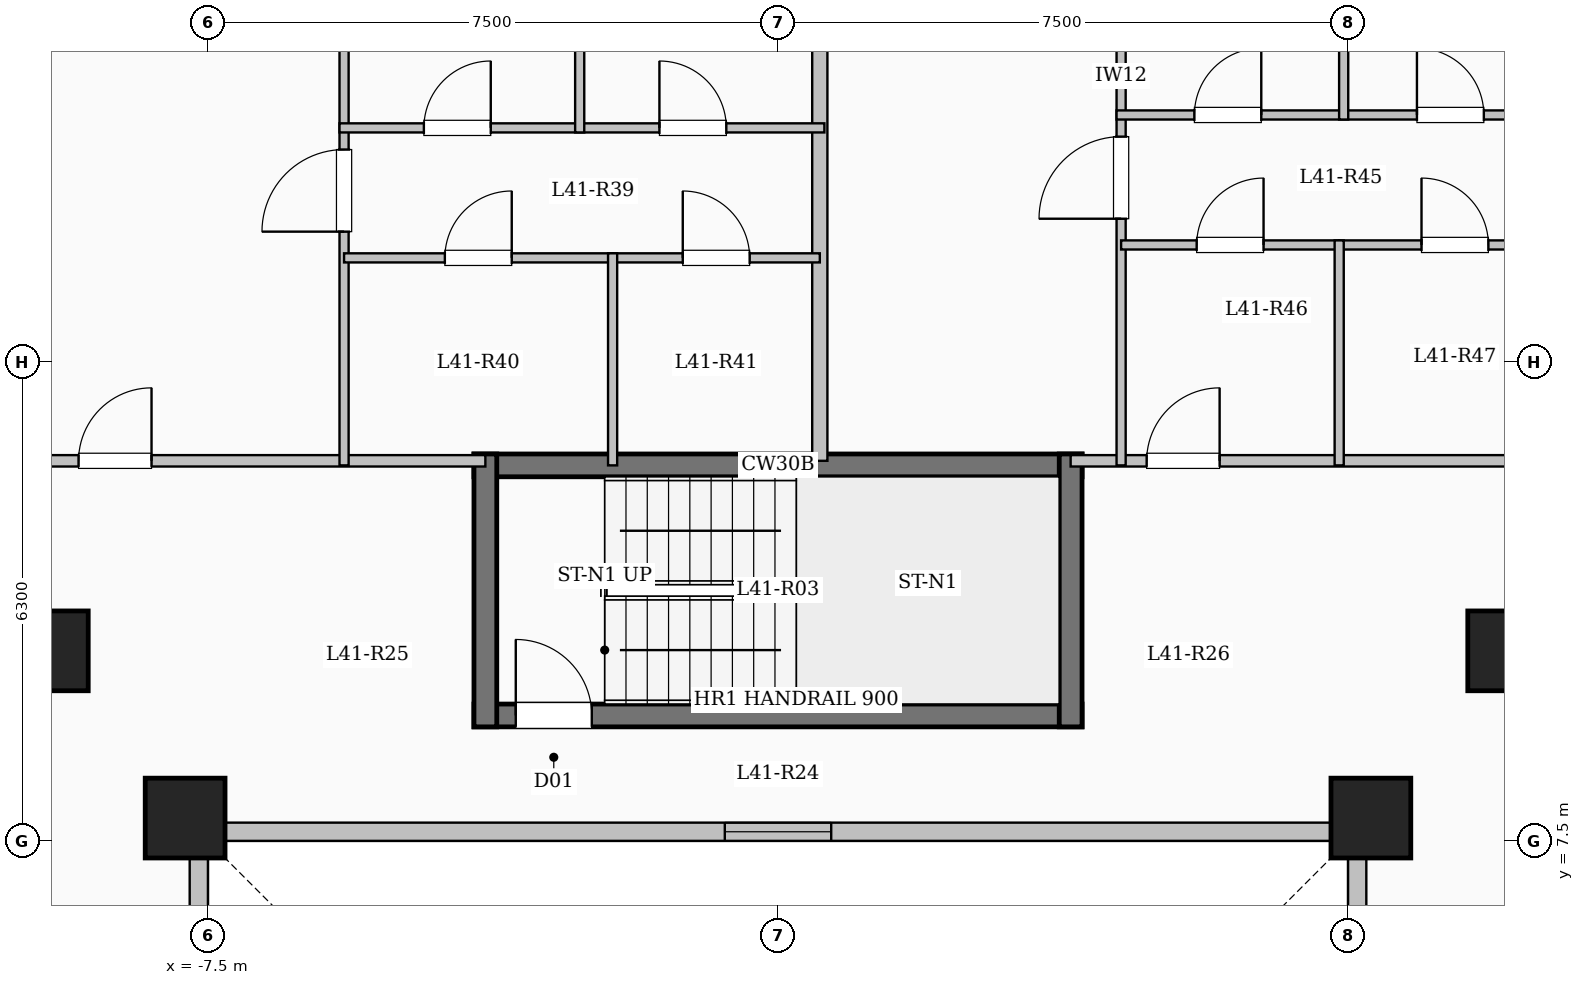
"""IFC4 building model, lengths in metres.
Left out: names, types, materials, properties, quantities, classifications, styles, units other than length and angle.
Written with IfcOpenShell. Run it as: python <this file> out.ifc"""

import sys

from ifc_helpers import new_model, si_unit, direction, frame, frame_2d, origin, origin_2d, place, context, subcontext, project, spatial, rectangle, extrude, element, fill, save


model = new_model("IFC4")
c1 = context("Model", 3, precision=1e-05, world=origin(), true_north=direction((0.0, 1.0)))
c2 = subcontext(c1, "Body", "Model", "MODEL_VIEW")
j1 = project(units=[si_unit("LENGTHUNIT", "METRE"), si_unit("PLANEANGLEUNIT", "RADIAN")], contexts=[c1])
p1 = place(None, origin())
s1 = spatial("IfcSite", under=j1, at=p1, CompositionType="ELEMENT")
p2 = place(p1, origin())
s2 = spatial("IfcBuilding", under=s1, at=p2, CompositionType="ELEMENT")
p3 = place(p2, frame((0.0, 0.0, 152.7)))
s3 = spatial("IfcBuildingStorey", under=s2, at=p3, CompositionType="ELEMENT", Elevation=152.7)
for number, where, z_axis, x_axis in (
    (1, (-7.8, 7.8, 0.0), (0.0, 0.0, 1.0), (1.0, 0.0, 0.0)),
    (2, (7.8, 7.8, 0.0), (0.0, 0.0, 1.0), (1.0, 0.0, 0.0)),
    (3, (-9.6, 10.0, 0.0), (0.0, 0.0, 1.0), (1.0, 0.0, 0.0)),
    (4, (9.6, 10.0, 0.0), (0.0, 0.0, 1.0), (1.0, 0.0, 0.0)),
):
    element("IfcColumn", number, at=place(p3, frame(where, z_axis=z_axis, x_axis=x_axis)), inside=s3, PredefinedType="COLUMN", context=c2, shape_type="SweptSolid", body=[
        extrude(rectangle(XDim=1.05, YDim=1.05, at=origin_2d()), origin(), (0.0, 0.0, 1.0), 3.35),
    ])
p4 = place(p3, frame((7.62, -7.62, 0.0), z_axis=(0.0, 0.0, 1.0), x_axis=(0.0, 1.0, 0.0)))
e5 = element("IfcWall", 5, at=p4, inside=s3, PredefinedType="SOLIDWALL", context=c2, shape_type="SweptSolid", body=[
    extrude(rectangle(XDim=15.24, YDim=0.24, at=frame_2d((7.62, 0.0))), origin(), (0.0, 0.0, 1.0), 3.1),
])
p5 = place(p4, frame((6.92, 0.0, 0.95)))
e6 = element("IfcOpeningElement", 6, at=p5, cuts=e5, PredefinedType="OPENING", context=c2, shape_type="SweptSolid", body=[
    extrude(rectangle(XDim=1.4, YDim=1.5, at=frame_2d((0.7, 0.75))), frame((0.0, 0.13, 0.0), z_axis=(0.0, -1.0, 0.0), x_axis=(1.0, 0.0, 0.0)), (0.0, 0.0, 1.0), 0.26),
])
p6 = place(p3, frame((7.62, 7.62, 0.0), z_axis=(0.0, 0.0, 1.0), x_axis=(-1.0, 0.0, 0.0)))
e7 = element("IfcWall", 7, at=p6, inside=s3, PredefinedType="SOLIDWALL", context=c2, shape_type="SweptSolid", body=[
    extrude(rectangle(XDim=15.24, YDim=0.24, at=frame_2d((7.62, 0.0))), origin(), (0.0, 0.0, 1.0), 3.1),
])
p7 = place(p6, frame((6.92, 0.0, 0.95)))
e8 = element("IfcOpeningElement", 8, at=p7, cuts=e7, PredefinedType="OPENING", context=c2, shape_type="SweptSolid", body=[
    extrude(rectangle(XDim=1.4, YDim=1.5, at=frame_2d((0.7, 0.75))), frame((0.0, 0.13, 0.0), z_axis=(0.0, -1.0, 0.0), x_axis=(1.0, 0.0, 0.0)), (0.0, 0.0, 1.0), 0.26),
])
p8 = place(p3, frame((-7.62, 7.62, 0.0), z_axis=(0.0, 0.0, 1.0), x_axis=(0.0, -1.0, 0.0)))
e9 = element("IfcWall", 9, at=p8, inside=s3, PredefinedType="SOLIDWALL", context=c2, shape_type="SweptSolid", body=[
    extrude(rectangle(XDim=15.24, YDim=0.24, at=frame_2d((7.62, 0.0))), origin(), (0.0, 0.0, 1.0), 3.1),
])
p9 = place(p8, frame((6.92, 0.0, 0.95)))
e10 = element("IfcOpeningElement", 10, at=p9, cuts=e9, PredefinedType="OPENING", context=c2, shape_type="SweptSolid", body=[
    extrude(rectangle(XDim=1.4, YDim=1.5, at=frame_2d((0.7, 0.75))), frame((0.0, 0.13, 0.0), z_axis=(0.0, -1.0, 0.0), x_axis=(1.0, 0.0, 0.0)), (0.0, 0.0, 1.0), 0.26),
])
p10 = place(p3, frame((-4.0, 12.44, 0.0), z_axis=(0.0, 0.0, 1.0), x_axis=(1.0, 0.0, 0.0)))
e11 = element("IfcWall", 11, at=p10, inside=s3, PredefinedType="SHEAR", context=c2, shape_type="SweptSolid", body=[
    extrude(rectangle(XDim=8.0, YDim=0.3, at=frame_2d((4.0, 0.0))), origin(), (0.0, 0.0, 1.0), 3.35),
])
p11 = place(p3, frame((-4.0, 9.15, 0.0), z_axis=(0.0, 0.0, 1.0), x_axis=(1.0, 0.0, 0.0)))
e12 = element("IfcWall", 12, at=p11, inside=s3, PredefinedType="SHEAR", context=c2, shape_type="SweptSolid", body=[
    extrude(rectangle(XDim=8.0, YDim=0.3, at=frame_2d((4.0, 0.0))), origin(), (0.0, 0.0, 1.0), 3.35),
])
p12 = place(p11, frame((0.55, 0.0, 0.0)))
e13 = element("IfcOpeningElement", 13, at=p12, cuts=e12, PredefinedType="OPENING", context=c2, shape_type="SweptSolid", body=[
    extrude(rectangle(XDim=1.0, YDim=2.15, at=frame_2d((0.5, 1.075))), frame((0.0, 0.16, 0.0), z_axis=(0.0, -1.0, 0.0), x_axis=(1.0, 0.0, 0.0)), (0.0, 0.0, 1.0), 0.32),
])
for number, where, z_axis, x_axis in (
    (14, (-3.85, 9.0, 0.0), (0.0, 0.0, 1.0), (0.0, 1.0, 0.0)),
    (15, (3.85, 9.0, 0.0), (0.0, 0.0, 1.0), (0.0, 1.0, 0.0)),
):
    element("IfcWall", number, at=place(p3, frame(where, z_axis=z_axis, x_axis=x_axis)), inside=s3, PredefinedType="SHEAR", context=c2, shape_type="SweptSolid", body=[
        extrude(rectangle(XDim=3.59, YDim=0.3, at=frame_2d((1.795, 0.0))), origin(), (0.0, 0.0, 1.0), 3.35),
    ])
p13 = place(p3, frame((-19.55, 12.5, 0.0), z_axis=(0.0, 0.0, 1.0), x_axis=(1.0, 0.0, 0.0)))
e16 = element("IfcWall", 16, at=p13, inside=s3, PredefinedType="PARTITIONING", context=c2, shape_type="SweptSolid", body=[
    extrude(rectangle(XDim=15.7, YDim=0.15, at=frame_2d((7.85, 0.0))), origin(), (0.0, 0.0, 1.0), 3.1),
])
p14 = place(p13, frame((0.7, 0.0, 0.0)))
e17 = element("IfcOpeningElement", 17, at=p14, cuts=e16, PredefinedType="OPENING", context=c2, shape_type="SweptSolid", body=[
    extrude(rectangle(XDim=0.96, YDim=2.15, at=frame_2d((0.48, 1.075))), frame((0.0, 0.085, 0.0), z_axis=(0.0, -1.0, 0.0), x_axis=(1.0, 0.0, 0.0)), (0.0, 0.0, 1.0), 0.17),
])
p15 = place(p13, frame((10.348, 0.0, 0.0)))
e18 = element("IfcOpeningElement", 18, at=p15, cuts=e16, PredefinedType="OPENING", context=c2, shape_type="SweptSolid", body=[
    extrude(rectangle(XDim=0.96, YDim=2.15, at=frame_2d((0.48, 1.075))), frame((0.0, 0.085, 0.0), z_axis=(0.0, -1.0, 0.0), x_axis=(1.0, 0.0, 0.0)), (0.0, 0.0, 1.0), 0.17),
])
p16 = place(p3, frame((3.85, 12.5, 0.0), z_axis=(0.0, 0.0, 1.0), x_axis=(1.0, 0.0, 0.0)))
e19 = element("IfcWall", 19, at=p16, inside=s3, PredefinedType="PARTITIONING", context=c2, shape_type="SweptSolid", body=[
    extrude(rectangle(XDim=15.7, YDim=0.15, at=frame_2d((7.85, 0.0))), origin(), (0.0, 0.0, 1.0), 3.1),
])
p17 = place(p16, frame((1.0, 0.0, 0.0)))
e20 = element("IfcOpeningElement", 20, at=p17, cuts=e19, PredefinedType="OPENING", context=c2, shape_type="SweptSolid", body=[
    extrude(rectangle(XDim=0.96, YDim=2.15, at=frame_2d((0.48, 1.075))), frame((0.0, 0.085, 0.0), z_axis=(0.0, -1.0, 0.0), x_axis=(1.0, 0.0, 0.0)), (0.0, 0.0, 1.0), 0.17),
])
p18 = place(p16, frame((7.28, 0.0, 0.0)))
e21 = element("IfcOpeningElement", 21, at=p18, cuts=e19, PredefinedType="OPENING", context=c2, shape_type="SweptSolid", body=[
    extrude(rectangle(XDim=0.96, YDim=2.15, at=frame_2d((0.48, 1.075))), frame((0.0, 0.085, 0.0), z_axis=(0.0, -1.0, 0.0), x_axis=(1.0, 0.0, 0.0)), (0.0, 0.0, 1.0), 0.17),
])
p19 = place(p3, frame((0.55, 12.5, 0.0), z_axis=(0.0, 0.0, 1.0), x_axis=(0.0, 1.0, 0.0)))
e22 = element("IfcWall", 22, at=p19, inside=s3, PredefinedType="SOLIDWALL", context=c2, shape_type="SweptSolid", body=[
    extrude(rectangle(XDim=10.18, YDim=0.2, at=frame_2d((5.09, 0.0))), origin(), (0.0, 0.0, 1.0), 3.1),
])
p20 = place(p3, frame((-5.709, 12.44, 0.0), z_axis=(0.0, 0.0, 1.0), x_axis=(0.0, 1.0, 0.0)))
e23 = element("IfcWall", 23, at=p20, inside=s3, PredefinedType="PARTITIONING", context=c2, shape_type="SweptSolid", body=[
    extrude(rectangle(XDim=10.065, YDim=0.12, at=frame_2d((5.032, 0.0))), origin(), (0.0, 0.0, 1.0), 3.1),
])
p21 = place(p20, frame((3.075, 0.0, 0.0)))
e24 = element("IfcOpeningElement", 24, at=p21, cuts=e23, PredefinedType="OPENING", context=c2, shape_type="SweptSolid", body=[
    extrude(rectangle(XDim=1.08, YDim=2.15, at=frame_2d((0.54, 1.075))), frame((0.0, 0.07, 0.0), z_axis=(0.0, -1.0, 0.0), x_axis=(1.0, 0.0, 0.0)), (0.0, 0.0, 1.0), 0.14),
])
p22 = place(p3, frame((-5.709, 15.17, 0.0), z_axis=(0.0, 0.0, 1.0), x_axis=(1.0, 0.0, 0.0)))
e25 = element("IfcWall", 25, at=p22, inside=s3, PredefinedType="PARTITIONING", context=c2, shape_type="SweptSolid", body=[
    extrude(rectangle(XDim=3.533, YDim=0.12, at=frame_2d((1.767, 0.0))), origin(), (0.0, 0.0, 1.0), 3.1),
])
p23 = place(p22, frame((1.326, 0.0, 0.0)))
e26 = element("IfcOpeningElement", 26, at=p23, cuts=e25, PredefinedType="OPENING", context=c2, shape_type="SweptSolid", body=[
    extrude(rectangle(XDim=0.88, YDim=2.1, at=frame_2d((0.44, 1.05))), frame((0.0, 0.07, 0.0), z_axis=(0.0, -1.0, 0.0), x_axis=(1.0, 0.0, 0.0)), (0.0, 0.0, 1.0), 0.14),
])
p24 = place(p3, frame((-2.176, 15.17, 0.0), z_axis=(0.0, 0.0, 1.0), x_axis=(1.0, 0.0, 0.0)))
e27 = element("IfcWall", 27, at=p24, inside=s3, PredefinedType="PARTITIONING", context=c2, shape_type="SweptSolid", body=[
    extrude(rectangle(XDim=2.726, YDim=0.12, at=frame_2d((1.363, 0.0))), origin(), (0.0, 0.0, 1.0), 3.1),
])
p25 = place(p24, frame((0.923, 0.0, 0.0)))
e28 = element("IfcOpeningElement", 28, at=p25, cuts=e27, PredefinedType="OPENING", context=c2, shape_type="SweptSolid", body=[
    extrude(rectangle(XDim=0.88, YDim=2.1, at=frame_2d((0.44, 1.05))), frame((0.0, 0.07, 0.0), z_axis=(0.0, -1.0, 0.0), x_axis=(1.0, 0.0, 0.0)), (0.0, 0.0, 1.0), 0.14),
])
p26 = place(p3, frame((-5.769, 16.88, 0.0), z_axis=(0.0, 0.0, 1.0), x_axis=(1.0, 0.0, 0.0)))
e29 = element("IfcWall", 29, at=p26, inside=s3, PredefinedType="PARTITIONING", context=c2, shape_type="SweptSolid", body=[
    extrude(rectangle(XDim=6.379, YDim=0.12, at=frame_2d((3.189, 0.0))), origin(), (0.0, 0.0, 1.0), 2.685),
])
p27 = place(p26, frame((1.11, 0.0, 0.0)))
e30 = element("IfcOpeningElement", 30, at=p27, cuts=e29, PredefinedType="OPENING", context=c2, shape_type="SweptSolid", body=[
    extrude(rectangle(XDim=0.88, YDim=2.1, at=frame_2d((0.44, 1.05))), frame((0.0, 0.07, 0.0), z_axis=(0.0, -1.0, 0.0), x_axis=(1.0, 0.0, 0.0)), (0.0, 0.0, 1.0), 0.14),
])
p28 = place(p26, frame((4.209, 0.0, 0.0)))
e31 = element("IfcOpeningElement", 31, at=p28, cuts=e29, PredefinedType="OPENING", context=c2, shape_type="SweptSolid", body=[
    extrude(rectangle(XDim=0.88, YDim=2.1, at=frame_2d((0.44, 1.05))), frame((0.0, 0.07, 0.0), z_axis=(0.0, -1.0, 0.0), x_axis=(1.0, 0.0, 0.0)), (0.0, 0.0, 1.0), 0.14),
])
p29 = place(p3, frame((-2.176, 12.44, 0.0), z_axis=(0.0, 0.0, 1.0), x_axis=(0.0, 1.0, 0.0)))
e32 = element("IfcWall", 32, at=p29, inside=s3, PredefinedType="PARTITIONING", context=c2, shape_type="SweptSolid", body=[
    extrude(rectangle(XDim=2.79, YDim=0.12, at=frame_2d((1.395, 0.0))), origin(), (0.0, 0.0, 1.0), 3.1),
])
p30 = place(p3, frame((-2.609, 16.82, 0.0), z_axis=(0.0, 0.0, 1.0), x_axis=(0.0, 1.0, 0.0)))
e33 = element("IfcWall", 33, at=p30, inside=s3, PredefinedType="PARTITIONING", context=c2, shape_type="SweptSolid", body=[
    extrude(rectangle(XDim=5.86, YDim=0.12, at=frame_2d((2.93, 0.0))), origin(), (0.0, 0.0, 1.0), 3.1),
])
p31 = place(p3, frame((4.514, 12.44, 0.0), z_axis=(0.0, 0.0, 1.0), x_axis=(0.0, 1.0, 0.0)))
e34 = element("IfcWall", 34, at=p31, inside=s3, PredefinedType="PARTITIONING", context=c2, shape_type="SweptSolid", body=[
    extrude(rectangle(XDim=10.24, YDim=0.12, at=frame_2d((5.12, 0.0))), origin(), (0.0, 0.0, 1.0), 3.1),
])
p32 = place(p31, frame((3.245, 0.0, 0.0)))
e35 = element("IfcOpeningElement", 35, at=p32, cuts=e34, PredefinedType="OPENING", context=c2, shape_type="SweptSolid", body=[
    extrude(rectangle(XDim=1.08, YDim=2.15, at=frame_2d((0.54, 1.075))), frame((0.0, 0.07, 0.0), z_axis=(0.0, -1.0, 0.0), x_axis=(1.0, 0.0, 0.0)), (0.0, 0.0, 1.0), 0.14),
])
p33 = place(p3, frame((4.514, 15.34, 0.0), z_axis=(0.0, 0.0, 1.0), x_axis=(1.0, 0.0, 0.0)))
e36 = element("IfcWall", 36, at=p33, inside=s3, PredefinedType="PARTITIONING", context=c2, shape_type="SweptSolid", body=[
    extrude(rectangle(XDim=2.869, YDim=0.12, at=frame_2d((1.435, 0.0))), origin(), (0.0, 0.0, 1.0), 3.1),
])
p34 = place(p33, frame((0.994, 0.0, 0.0)))
e37 = element("IfcOpeningElement", 37, at=p34, cuts=e36, PredefinedType="OPENING", context=c2, shape_type="SweptSolid", body=[
    extrude(rectangle(XDim=0.88, YDim=2.1, at=frame_2d((0.44, 1.05))), frame((0.0, 0.07, 0.0), z_axis=(0.0, -1.0, 0.0), x_axis=(1.0, 0.0, 0.0)), (0.0, 0.0, 1.0), 0.14),
])
p35 = place(p3, frame((7.383, 15.34, 0.0), z_axis=(0.0, 0.0, 1.0), x_axis=(1.0, 0.0, 0.0)))
e38 = element("IfcWall", 38, at=p35, inside=s3, PredefinedType="PARTITIONING", context=c2, shape_type="SweptSolid", body=[
    extrude(rectangle(XDim=3.047, YDim=0.12, at=frame_2d((1.523, 0.0))), origin(), (0.0, 0.0, 1.0), 3.1),
])
p36 = place(p35, frame((1.083, 0.0, 0.0)))
e39 = element("IfcOpeningElement", 39, at=p36, cuts=e38, PredefinedType="OPENING", context=c2, shape_type="SweptSolid", body=[
    extrude(rectangle(XDim=0.88, YDim=2.1, at=frame_2d((0.44, 1.05))), frame((0.0, 0.07, 0.0), z_axis=(0.0, -1.0, 0.0), x_axis=(1.0, 0.0, 0.0)), (0.0, 0.0, 1.0), 0.14),
])
p37 = place(p3, frame((4.454, 17.05, 0.0), z_axis=(0.0, 0.0, 1.0), x_axis=(1.0, 0.0, 0.0)))
e40 = element("IfcWall", 40, at=p37, inside=s3, PredefinedType="PARTITIONING", context=c2, shape_type="SweptSolid", body=[
    extrude(rectangle(XDim=6.036, YDim=0.12, at=frame_2d((3.018, 0.0))), origin(), (0.0, 0.0, 1.0), 2.685),
])
p38 = place(p37, frame((1.024, 0.0, 0.0)))
e41 = element("IfcOpeningElement", 41, at=p38, cuts=e40, PredefinedType="OPENING", context=c2, shape_type="SweptSolid", body=[
    extrude(rectangle(XDim=0.88, YDim=2.1, at=frame_2d((0.44, 1.05))), frame((0.0, 0.07, 0.0), z_axis=(0.0, -1.0, 0.0), x_axis=(1.0, 0.0, 0.0)), (0.0, 0.0, 1.0), 0.14),
])
p39 = place(p37, frame((3.952, 0.0, 0.0)))
e42 = element("IfcOpeningElement", 42, at=p39, cuts=e40, PredefinedType="OPENING", context=c2, shape_type="SweptSolid", body=[
    extrude(rectangle(XDim=0.88, YDim=2.1, at=frame_2d((0.44, 1.05))), frame((0.0, 0.07, 0.0), z_axis=(0.0, -1.0, 0.0), x_axis=(1.0, 0.0, 0.0)), (0.0, 0.0, 1.0), 0.14),
])
p40 = place(p3, frame((7.383, 12.44, 0.0), z_axis=(0.0, 0.0, 1.0), x_axis=(0.0, 1.0, 0.0)))
e43 = element("IfcWall", 43, at=p40, inside=s3, PredefinedType="PARTITIONING", context=c2, shape_type="SweptSolid", body=[
    extrude(rectangle(XDim=2.96, YDim=0.12, at=frame_2d((1.48, 0.0))), origin(), (0.0, 0.0, 1.0), 2.585),
])
p41 = place(p3, frame((7.442, 16.99, 0.0), z_axis=(0.0, 0.0, 1.0), x_axis=(0.0, 1.0, 0.0)))
e44 = element("IfcWall", 44, at=p41, inside=s3, PredefinedType="PARTITIONING", context=c2, shape_type="SweptSolid", body=[
    extrude(rectangle(XDim=5.088, YDim=0.12, at=frame_2d((2.544, 0.0))), origin(), (0.0, 0.0, 1.0), 2.585),
])
p42 = place(p7, origin())
e45 = element("IfcWindow", 45, at=p42, inside=s3, PartitioningType="SINGLE_PANEL", PredefinedType="WINDOW", context=c2, shape_type="SweptSolid", body=[
    extrude(rectangle(XDim=1.4, YDim=1.5, at=frame_2d((0.7, 0.75))), frame((0.0, 0.03, 0.0), z_axis=(0.0, -1.0, 0.0), x_axis=(1.0, 0.0, 0.0)), (0.0, 0.0, 1.0), 0.06),
])
fill(e8, e45)
p43 = place(p12, origin())
e46 = element("IfcDoor", 46, at=p43, inside=s3, OperationType="SINGLE_SWING_LEFT", PredefinedType="DOOR", context=c2, shape_type="SweptSolid", body=[
    extrude(rectangle(XDim=1.0, YDim=2.15, at=frame_2d((0.5, 1.075))), frame((0.0, 0.025, 0.0), z_axis=(0.0, -1.0, 0.0), x_axis=(1.0, 0.0, 0.0)), (0.0, 0.0, 1.0), 0.05),
])
fill(e13, e46)
p44 = place(p15, origin())
e47 = element("IfcDoor", 47, at=p44, inside=s3, OperationType="SINGLE_SWING_RIGHT", PredefinedType="DOOR", context=c2, shape_type="SweptSolid", body=[
    extrude(rectangle(XDim=0.96, YDim=2.15, at=frame_2d((0.48, 1.075))), frame((0.0, 0.025, 0.0), z_axis=(0.0, -1.0, 0.0), x_axis=(1.0, 0.0, 0.0)), (0.0, 0.0, 1.0), 0.05),
])
fill(e18, e47)
p45 = place(p21, origin())
e48 = element("IfcDoor", 48, at=p45, inside=s3, OperationType="SINGLE_SWING_LEFT", PredefinedType="DOOR", context=c2, shape_type="SweptSolid", body=[
    extrude(rectangle(XDim=1.08, YDim=2.15, at=frame_2d((0.54, 1.075))), frame((0.0, 0.025, 0.0), z_axis=(0.0, -1.0, 0.0), x_axis=(1.0, 0.0, 0.0)), (0.0, 0.0, 1.0), 0.05),
])
fill(e24, e48)
p46 = place(p23, origin())
e49 = element("IfcDoor", 49, at=p46, inside=s3, OperationType="SINGLE_SWING_RIGHT", PredefinedType="DOOR", context=c2, shape_type="SweptSolid", body=[
    extrude(rectangle(XDim=0.88, YDim=2.1, at=frame_2d((0.44, 1.05))), frame((0.0, 0.025, 0.0), z_axis=(0.0, -1.0, 0.0), x_axis=(1.0, 0.0, 0.0)), (0.0, 0.0, 1.0), 0.05),
])
fill(e26, e49)
p47 = place(p25, origin())
e50 = element("IfcDoor", 50, at=p47, inside=s3, OperationType="SINGLE_SWING_LEFT", PredefinedType="DOOR", context=c2, shape_type="SweptSolid", body=[
    extrude(rectangle(XDim=0.88, YDim=2.1, at=frame_2d((0.44, 1.05))), frame((0.0, 0.025, 0.0), z_axis=(0.0, -1.0, 0.0), x_axis=(1.0, 0.0, 0.0)), (0.0, 0.0, 1.0), 0.05),
])
fill(e28, e50)
p48 = place(p27, origin())
e51 = element("IfcDoor", 51, at=p48, inside=s3, OperationType="SINGLE_SWING_RIGHT", PredefinedType="DOOR", context=c2, shape_type="SweptSolid", body=[
    extrude(rectangle(XDim=0.88, YDim=2.1, at=frame_2d((0.44, 1.05))), frame((0.0, 0.025, 0.0), z_axis=(0.0, -1.0, 0.0), x_axis=(1.0, 0.0, 0.0)), (0.0, 0.0, 1.0), 0.05),
])
fill(e30, e51)
p49 = place(p28, origin())
e52 = element("IfcDoor", 52, at=p49, inside=s3, OperationType="SINGLE_SWING_LEFT", PredefinedType="DOOR", context=c2, shape_type="SweptSolid", body=[
    extrude(rectangle(XDim=0.88, YDim=2.1, at=frame_2d((0.44, 1.05))), frame((0.0, 0.025, 0.0), z_axis=(0.0, -1.0, 0.0), x_axis=(1.0, 0.0, 0.0)), (0.0, 0.0, 1.0), 0.05),
])
fill(e31, e52)
p50 = place(p17, origin())
e53 = element("IfcDoor", 53, at=p50, inside=s3, OperationType="SINGLE_SWING_RIGHT", PredefinedType="DOOR", context=c2, shape_type="SweptSolid", body=[
    extrude(rectangle(XDim=0.96, YDim=2.15, at=frame_2d((0.48, 1.075))), frame((0.0, 0.025, 0.0), z_axis=(0.0, -1.0, 0.0), x_axis=(1.0, 0.0, 0.0)), (0.0, 0.0, 1.0), 0.05),
])
fill(e20, e53)
p51 = place(p32, origin())
e54 = element("IfcDoor", 54, at=p51, inside=s3, OperationType="SINGLE_SWING_LEFT", PredefinedType="DOOR", context=c2, shape_type="SweptSolid", body=[
    extrude(rectangle(XDim=1.08, YDim=2.15, at=frame_2d((0.54, 1.075))), frame((0.0, 0.025, 0.0), z_axis=(0.0, -1.0, 0.0), x_axis=(1.0, 0.0, 0.0)), (0.0, 0.0, 1.0), 0.05),
])
fill(e35, e54)
p52 = place(p34, origin())
e55 = element("IfcDoor", 55, at=p52, inside=s3, OperationType="SINGLE_SWING_RIGHT", PredefinedType="DOOR", context=c2, shape_type="SweptSolid", body=[
    extrude(rectangle(XDim=0.88, YDim=2.1, at=frame_2d((0.44, 1.05))), frame((0.0, 0.025, 0.0), z_axis=(0.0, -1.0, 0.0), x_axis=(1.0, 0.0, 0.0)), (0.0, 0.0, 1.0), 0.05),
])
fill(e37, e55)
p53 = place(p36, origin())
e56 = element("IfcDoor", 56, at=p53, inside=s3, OperationType="SINGLE_SWING_LEFT", PredefinedType="DOOR", context=c2, shape_type="SweptSolid", body=[
    extrude(rectangle(XDim=0.88, YDim=2.1, at=frame_2d((0.44, 1.05))), frame((0.0, 0.025, 0.0), z_axis=(0.0, -1.0, 0.0), x_axis=(1.0, 0.0, 0.0)), (0.0, 0.0, 1.0), 0.05),
])
fill(e39, e56)
p54 = place(p38, origin())
e57 = element("IfcDoor", 57, at=p54, inside=s3, OperationType="SINGLE_SWING_RIGHT", PredefinedType="DOOR", context=c2, shape_type="SweptSolid", body=[
    extrude(rectangle(XDim=0.88, YDim=2.1, at=frame_2d((0.44, 1.05))), frame((0.0, 0.025, 0.0), z_axis=(0.0, -1.0, 0.0), x_axis=(1.0, 0.0, 0.0)), (0.0, 0.0, 1.0), 0.05),
])
fill(e41, e57)
p55 = place(p39, origin())
e58 = element("IfcDoor", 58, at=p55, inside=s3, OperationType="SINGLE_SWING_LEFT", PredefinedType="DOOR", context=c2, shape_type="SweptSolid", body=[
    extrude(rectangle(XDim=0.88, YDim=2.1, at=frame_2d((0.44, 1.05))), frame((0.0, 0.025, 0.0), z_axis=(0.0, -1.0, 0.0), x_axis=(1.0, 0.0, 0.0)), (0.0, 0.0, 1.0), 0.05),
])
fill(e42, e58)
save(model, sys.argv[1])
